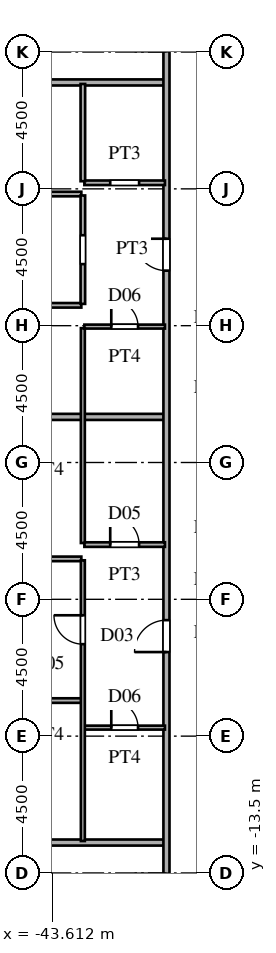
"""IFC4 building model, lengths in metres.
Left out: names, types, materials, properties, quantities, classifications, styles, units other than length and angle.
Written with IfcOpenShell. Run it as: python <this file> out.ifc"""

import sys

from ifc_helpers import new_model, si_unit, direction, frame, frame_2d, origin, place, context, subcontext, project, spatial, rectangle, extrude, source, transform, mapped, element, fill, save


model = new_model("IFC4")
c1 = context("Model", 3, precision=1e-05, world=origin(), true_north=direction((0.0, 1.0)))
c2 = subcontext(c1, "Body", "Model", "MODEL_VIEW")
j1 = project(units=[si_unit("LENGTHUNIT", "METRE"), si_unit("PLANEANGLEUNIT", "RADIAN")], contexts=[c1])
p1 = place(None, origin())
s1 = spatial("IfcSite", under=j1, at=p1, CompositionType="ELEMENT")
p2 = place(p1, origin())
s2 = spatial("IfcBuilding", under=s1, at=p2, CompositionType="ELEMENT")
p3 = place(p2, frame((0.0, 0.0, 54.9)))
s3 = spatial("IfcBuildingStorey", under=s2, at=p3, CompositionType="ELEMENT", Elevation=54.9)
p4 = place(p3, frame((-66.337, -12.5, 0.0), z_axis=(0.0, 0.0, 1.0), x_axis=(1.0, 0.0, 0.0)))
e1 = element("IfcWall", 1, at=p4, inside=s3, PredefinedType="PARTITIONING", context=c2, shape_type="SweptSolid", body=[
    extrude(rectangle(XDim=26.407, YDim=0.2, at=frame_2d((13.204, 0.0))), origin(), (0.0, 0.0, 1.0), 3.38),
])
p5 = place(p3, frame((-42.55, -8.72, 0.0), z_axis=(0.0, 0.0, 1.0), x_axis=(1.0, 0.0, 0.0)))
e2 = element("IfcWall", 2, at=p5, inside=s3, PredefinedType="PARTITIONING", context=c2, shape_type="SweptSolid", body=[
    extrude(rectangle(XDim=2.65, YDim=0.13, at=frame_2d((1.325, 0.0))), origin(), (0.0, 0.0, 1.0), 3.38),
])
p6 = place(p5, frame((0.885, 0.0, 0.0)))
e3 = element("IfcOpeningElement", 3, at=p6, cuts=e2, PredefinedType="OPENING", context=c2, shape_type="SweptSolid", body=[
    extrude(rectangle(XDim=0.88, YDim=2.1, at=frame_2d((0.44, 1.05))), frame((0.0, 0.075, 0.0), z_axis=(0.0, -1.0, 0.0), x_axis=(1.0, 0.0, 0.0)), (0.0, 0.0, 1.0), 0.15),
])
p7 = place(p3, frame((-72.535, -7.83, 0.0), z_axis=(0.0, 0.0, 1.0), x_axis=(1.0, 0.0, 0.0)))
e4 = element("IfcWall", 4, at=p7, inside=s3, PredefinedType="PARTITIONING", context=c2, shape_type="SweptSolid", body=[
    extrude(rectangle(XDim=29.885, YDim=0.15, at=frame_2d((14.942, 0.0))), origin(), (0.0, 0.0, 1.0), 3.38),
])
p8 = place(p7, frame((23.51, 0.0, 0.0)))
e5 = element("IfcOpeningElement", 5, at=p8, cuts=e4, PredefinedType="OPENING", context=c2, shape_type="SweptSolid", body=[
    extrude(rectangle(XDim=0.95, YDim=2.15, at=frame_2d((0.475, 1.075))), frame((0.0, 0.085, 0.0), z_axis=(0.0, -1.0, 0.0), x_axis=(1.0, 0.0, 0.0)), (0.0, 0.0, 1.0), 0.17),
])
p9 = place(p7, frame((14.71, 0.0, 0.0)))
e6 = element("IfcOpeningElement", 6, at=p9, cuts=e4, PredefinedType="OPENING", context=c2, shape_type="SweptSolid", body=[
    extrude(rectangle(XDim=0.95, YDim=2.15, at=frame_2d((0.475, 1.075))), frame((0.0, 0.085, 0.0), z_axis=(0.0, -1.0, 0.0), x_axis=(1.0, 0.0, 0.0)), (0.0, 0.0, 1.0), 0.17),
])
p10 = place(p3, frame((-72.535, -3.17, 0.0), z_axis=(0.0, 0.0, 1.0), x_axis=(1.0, 0.0, 0.0)))
e7 = element("IfcWall", 7, at=p10, inside=s3, PredefinedType="PARTITIONING", context=c2, shape_type="SweptSolid", body=[
    extrude(rectangle(XDim=29.885, YDim=0.15, at=frame_2d((14.942, 0.0))), origin(), (0.0, 0.0, 1.0), 3.38),
])
p11 = place(p10, frame((23.51, 0.0, 0.0)))
e8 = element("IfcOpeningElement", 8, at=p11, cuts=e7, PredefinedType="OPENING", context=c2, shape_type="SweptSolid", body=[
    extrude(rectangle(XDim=0.95, YDim=2.15, at=frame_2d((0.475, 1.075))), frame((0.0, 0.085, 0.0), z_axis=(0.0, -1.0, 0.0), x_axis=(1.0, 0.0, 0.0)), (0.0, 0.0, 1.0), 0.17),
])
p12 = place(p10, frame((14.71, 0.0, 0.0)))
e9 = element("IfcOpeningElement", 9, at=p12, cuts=e7, PredefinedType="OPENING", context=c2, shape_type="SweptSolid", body=[
    extrude(rectangle(XDim=0.95, YDim=2.15, at=frame_2d((0.475, 1.075))), frame((0.0, 0.085, 0.0), z_axis=(0.0, -1.0, 0.0), x_axis=(1.0, 0.0, 0.0)), (0.0, 0.0, 1.0), 0.17),
])
p13 = place(p3, frame((-42.55, -2.7, 0.0), z_axis=(0.0, 0.0, 1.0), x_axis=(1.0, 0.0, 0.0)))
e10 = element("IfcWall", 10, at=p13, inside=s3, PredefinedType="PARTITIONING", context=c2, shape_type="SweptSolid", body=[
    extrude(rectangle(XDim=2.65, YDim=0.15, at=frame_2d((1.325, 0.0))), origin(), (0.0, 0.0, 1.0), 3.38),
])
p14 = place(p13, frame((0.85, 0.0, 0.0)))
e11 = element("IfcOpeningElement", 11, at=p14, cuts=e10, PredefinedType="OPENING", context=c2, shape_type="SweptSolid", body=[
    extrude(rectangle(XDim=0.95, YDim=2.15, at=frame_2d((0.475, 1.075))), frame((0.0, 0.085, 0.0), z_axis=(0.0, -1.0, 0.0), x_axis=(1.0, 0.0, 0.0)), (0.0, 0.0, 1.0), 0.17),
])
p15 = place(p3, frame((-72.505, 1.5, 0.0), z_axis=(0.0, 0.0, 1.0), x_axis=(1.0, 0.0, 0.0)))
e12 = element("IfcWall", 12, at=p15, inside=s3, PredefinedType="PARTITIONING", context=c2, shape_type="SweptSolid", body=[
    extrude(rectangle(XDim=32.575, YDim=0.2, at=frame_2d((16.288, 0.0))), origin(), (0.0, 0.0, 1.0), 3.38),
])
p16 = place(p3, frame((-42.55, 4.47, 0.0), z_axis=(0.0, 0.0, 1.0), x_axis=(1.0, 0.0, 0.0)))
e13 = element("IfcWall", 13, at=p16, inside=s3, PredefinedType="PARTITIONING", context=c2, shape_type="SweptSolid", body=[
    extrude(rectangle(XDim=2.65, YDim=0.13, at=frame_2d((1.325, 0.0))), origin(), (0.0, 0.0, 1.0), 2.68),
])
p17 = place(p16, frame((0.885, 0.0, 0.0)))
e14 = element("IfcOpeningElement", 14, at=p17, cuts=e13, PredefinedType="OPENING", context=c2, shape_type="SweptSolid", body=[
    extrude(rectangle(XDim=0.88, YDim=2.1, at=frame_2d((0.44, 1.05))), frame((0.0, 0.075, 0.0), z_axis=(0.0, -1.0, 0.0), x_axis=(1.0, 0.0, 0.0)), (0.0, 0.0, 1.0), 0.15),
])
p18 = place(p3, frame((-72.535, 5.17, 0.0), z_axis=(0.0, 0.0, 1.0), x_axis=(1.0, 0.0, 0.0)))
e15 = element("IfcWall", 15, at=p18, inside=s3, PredefinedType="PARTITIONING", context=c2, shape_type="SweptSolid", body=[
    extrude(rectangle(XDim=29.885, YDim=0.15, at=frame_2d((14.942, 0.0))), origin(), (0.0, 0.0, 1.0), 3.38),
])
p19 = place(p18, frame((23.51, 0.0, 0.0)))
e16 = element("IfcOpeningElement", 16, at=p19, cuts=e15, PredefinedType="OPENING", context=c2, shape_type="SweptSolid", body=[
    extrude(rectangle(XDim=0.95, YDim=2.15, at=frame_2d((0.475, 1.075))), frame((0.0, 0.085, 0.0), z_axis=(0.0, -1.0, 0.0), x_axis=(1.0, 0.0, 0.0)), (0.0, 0.0, 1.0), 0.17),
])
p20 = place(p18, frame((14.71, 0.0, 0.0)))
e17 = element("IfcOpeningElement", 17, at=p20, cuts=e15, PredefinedType="OPENING", context=c2, shape_type="SweptSolid", body=[
    extrude(rectangle(XDim=0.95, YDim=2.15, at=frame_2d((0.475, 1.075))), frame((0.0, 0.085, 0.0), z_axis=(0.0, -1.0, 0.0), x_axis=(1.0, 0.0, 0.0)), (0.0, 0.0, 1.0), 0.17),
])
p21 = place(p3, frame((-72.535, 8.83, 0.0), z_axis=(0.0, 0.0, 1.0), x_axis=(1.0, 0.0, 0.0)))
e18 = element("IfcWall", 18, at=p21, inside=s3, PredefinedType="PARTITIONING", context=c2, shape_type="SweptSolid", body=[
    extrude(rectangle(XDim=29.885, YDim=0.15, at=frame_2d((14.942, 0.0))), origin(), (0.0, 0.0, 1.0), 3.38),
])
p22 = place(p21, frame((23.51, 0.0, 0.0)))
e19 = element("IfcOpeningElement", 19, at=p22, cuts=e18, PredefinedType="OPENING", context=c2, shape_type="SweptSolid", body=[
    extrude(rectangle(XDim=0.95, YDim=2.15, at=frame_2d((0.475, 1.075))), frame((0.0, 0.085, 0.0), z_axis=(0.0, -1.0, 0.0), x_axis=(1.0, 0.0, 0.0)), (0.0, 0.0, 1.0), 0.17),
])
p23 = place(p21, frame((14.71, 0.0, 0.0)))
e20 = element("IfcOpeningElement", 20, at=p23, cuts=e18, PredefinedType="OPENING", context=c2, shape_type="SweptSolid", body=[
    extrude(rectangle(XDim=0.95, YDim=2.15, at=frame_2d((0.475, 1.075))), frame((0.0, 0.085, 0.0), z_axis=(0.0, -1.0, 0.0), x_axis=(1.0, 0.0, 0.0)), (0.0, 0.0, 1.0), 0.17),
])
p24 = place(p3, frame((-42.55, 9.2, 0.0), z_axis=(0.0, 0.0, 1.0), x_axis=(1.0, 0.0, 0.0)))
e21 = element("IfcWall", 21, at=p24, inside=s3, PredefinedType="PARTITIONING", context=c2, shape_type="SweptSolid", body=[
    extrude(rectangle(XDim=2.65, YDim=0.15, at=frame_2d((1.325, 0.0))), origin(), (0.0, 0.0, 1.0), 3.38),
])
p25 = place(p24, frame((0.85, 0.0, 0.0)))
e22 = element("IfcOpeningElement", 22, at=p25, cuts=e21, PredefinedType="OPENING", context=c2, shape_type="SweptSolid", body=[
    extrude(rectangle(XDim=0.95, YDim=2.15, at=frame_2d((0.475, 1.075))), frame((0.0, 0.085, 0.0), z_axis=(0.0, -1.0, 0.0), x_axis=(1.0, 0.0, 0.0)), (0.0, 0.0, 1.0), 0.17),
])
p26 = place(p3, frame((-66.337, 12.5, 0.0), z_axis=(0.0, 0.0, 1.0), x_axis=(1.0, 0.0, 0.0)))
e23 = element("IfcWall", 23, at=p26, inside=s3, PredefinedType="PARTITIONING", context=c2, shape_type="SweptSolid", body=[
    extrude(rectangle(XDim=26.407, YDim=0.2, at=frame_2d((13.204, 0.0))), origin(), (0.0, 0.0, 1.0), 3.38),
])
p27 = place(p3, frame((-42.6, -12.45, 0.0), z_axis=(0.0, 0.0, 1.0), x_axis=(0.0, 1.0, 0.0)))
e24 = element("IfcWall", 24, at=p27, inside=s3, PredefinedType="PARTITIONING", context=c2, shape_type="SweptSolid", body=[
    extrude(rectangle(XDim=9.233, YDim=0.13, at=frame_2d((4.616, 0.0))), origin(), (0.0, 0.0, 1.0), 3.38),
])
p28 = place(p27, frame((6.475, 0.0, 0.0)))
e25 = element("IfcOpeningElement", 25, at=p28, cuts=e24, PredefinedType="OPENING", context=c2, shape_type="SweptSolid", body=[
    extrude(rectangle(XDim=0.95, YDim=2.15, at=frame_2d((0.475, 1.075))), frame((0.0, 0.075, 0.0), z_axis=(0.0, -1.0, 0.0), x_axis=(1.0, 0.0, 0.0)), (0.0, 0.0, 1.0), 0.15),
])
p29 = place(p3, frame((-42.6, -2.648, 0.0), z_axis=(0.0, 0.0, 1.0), x_axis=(0.0, 1.0, 0.0)))
e26 = element("IfcWall", 26, at=p29, inside=s3, PredefinedType="PARTITIONING", context=c2, shape_type="SweptSolid", body=[
    extrude(rectangle(XDim=7.066, YDim=0.13, at=frame_2d((3.533, 0.0))), origin(), (0.0, 0.0, 1.0), 3.38),
])
p30 = place(p3, frame((-42.6, 5.217, 0.0), z_axis=(0.0, 0.0, 1.0), x_axis=(0.0, 1.0, 0.0)))
e27 = element("IfcWall", 27, at=p30, inside=s3, PredefinedType="PARTITIONING", context=c2, shape_type="SweptSolid", body=[
    extrude(rectangle(XDim=3.566, YDim=0.15, at=frame_2d((1.783, 0.0))), origin(), (0.0, 0.0, 1.0), 3.38),
])
p31 = place(p30, frame((1.308, 0.0, 0.0)))
e28 = element("IfcOpeningElement", 28, at=p31, cuts=e27, PredefinedType="OPENING", context=c2, shape_type="SweptSolid", body=[
    extrude(rectangle(XDim=0.95, YDim=2.15, at=frame_2d((0.475, 1.075))), frame((0.0, 0.085, 0.0), z_axis=(0.0, -1.0, 0.0), x_axis=(1.0, 0.0, 0.0)), (0.0, 0.0, 1.0), 0.17),
])
p32 = place(p3, frame((-42.6, 9.252, 0.0), z_axis=(0.0, 0.0, 1.0), x_axis=(0.0, 1.0, 0.0)))
e29 = element("IfcWall", 29, at=p32, inside=s3, PredefinedType="PARTITIONING", context=c2, shape_type="SweptSolid", body=[
    extrude(rectangle(XDim=3.198, YDim=0.15, at=frame_2d((1.599, 0.0))), origin(), (0.0, 0.0, 1.0), 3.38),
])
p33 = place(p3, frame((-39.85, -15.515, 0.0), z_axis=(0.0, 0.0, 1.0), x_axis=(0.0, 1.0, 0.0)))
e30 = element("IfcWall", 30, at=p33, inside=s3, PredefinedType="PARTITIONING", context=c2, shape_type="SweptSolid", body=[
    extrude(rectangle(XDim=31.03, YDim=0.2, at=frame_2d((15.515, 0.0))), origin(), (0.0, 0.0, 1.0), 3.38),
])
p34 = place(p33, frame((0.94, 0.0, 0.0)))
e31 = element("IfcOpeningElement", 31, at=p34, cuts=e30, PredefinedType="OPENING", context=c2, shape_type="SweptSolid", body=[
    extrude(rectangle(XDim=1.05, YDim=2.25, at=frame_2d((0.525, 1.125))), frame((0.0, 0.11, 0.0), z_axis=(0.0, -1.0, 0.0), x_axis=(1.0, 0.0, 0.0)), (0.0, 0.0, 1.0), 0.22),
])
p35 = place(p33, frame((9.28, 0.0, 0.0)))
e32 = element("IfcOpeningElement", 32, at=p35, cuts=e30, PredefinedType="OPENING", context=c2, shape_type="SweptSolid", body=[
    extrude(rectangle(XDim=1.05, YDim=2.25, at=frame_2d((0.525, 1.125))), frame((0.0, 0.11, 0.0), z_axis=(0.0, -1.0, 0.0), x_axis=(1.0, 0.0, 0.0)), (0.0, 0.0, 1.0), 0.22),
])
p36 = place(p33, frame((21.825, 0.0, 0.0)))
e33 = element("IfcOpeningElement", 33, at=p36, cuts=e30, PredefinedType="OPENING", context=c2, shape_type="SweptSolid", body=[
    extrude(rectangle(XDim=1.05, YDim=2.25, at=frame_2d((0.525, 1.125))), frame((0.0, 0.11, 0.0), z_axis=(0.0, -1.0, 0.0), x_axis=(1.0, 0.0, 0.0)), (0.0, 0.0, 1.0), 0.22),
])
p37 = place(p33, frame((29.04, 0.0, 0.0)))
e34 = element("IfcOpeningElement", 34, at=p37, cuts=e30, PredefinedType="OPENING", context=c2, shape_type="SweptSolid", body=[
    extrude(rectangle(XDim=1.05, YDim=2.25, at=frame_2d((0.525, 1.125))), frame((0.0, 0.11, 0.0), z_axis=(0.0, -1.0, 0.0), x_axis=(1.0, 0.0, 0.0)), (0.0, 0.0, 1.0), 0.22),
])
m1 = source(origin(), c2, "Body", "SweptSolid", [
    extrude(rectangle(XDim=0.88, YDim=2.1, at=frame_2d((0.44, 1.05))), frame((0.0, 0.025, 0.0), z_axis=(0.0, -1.0, 0.0), x_axis=(1.0, 0.0, 0.0)), (0.0, 0.0, 1.0), 0.05),
])
p38 = place(p6, origin())
e35 = element("IfcDoor", 35, at=p38, inside=s3, OperationType="SINGLE_SWING_LEFT", PredefinedType="DOOR", context=c2, shape_type="MappedRepresentation", body=[
    mapped(m1, transform((0.0, 0.0, 0.0), scale=1.0)),
])
fill(e3, e35)
m2 = source(origin(), c2, "Body", "SweptSolid", [
    extrude(rectangle(XDim=0.95, YDim=2.15, at=frame_2d((0.475, 1.075))), frame((0.0, 0.025, 0.0), z_axis=(0.0, -1.0, 0.0), x_axis=(1.0, 0.0, 0.0)), (0.0, 0.0, 1.0), 0.05),
])
p39 = place(p14, origin())
e36 = element("IfcDoor", 36, at=p39, inside=s3, OperationType="SINGLE_SWING_LEFT", PredefinedType="DOOR", context=c2, shape_type="MappedRepresentation", body=[
    mapped(m2, transform((0.0, 0.0, 0.0), scale=1.0)),
])
fill(e11, e36)
p40 = place(p17, origin())
e37 = element("IfcDoor", 37, at=p40, inside=s3, OperationType="SINGLE_SWING_LEFT", PredefinedType="DOOR", context=c2, shape_type="MappedRepresentation", body=[
    mapped(m1, transform((0.0, 0.0, 0.0), scale=1.0)),
])
fill(e14, e37)
p41 = place(p28, origin())
e38 = element("IfcDoor", 38, at=p41, inside=s3, OperationType="SINGLE_SWING_RIGHT", PredefinedType="DOOR", context=c2, shape_type="MappedRepresentation", body=[
    mapped(m2, transform((0.0, 0.0, 0.0), scale=1.0)),
])
fill(e25, e38)
m3 = source(origin(), c2, "Body", "SweptSolid", [
    extrude(rectangle(XDim=1.05, YDim=2.25, at=frame_2d((0.525, 1.125))), frame((0.0, 0.025, 0.0), z_axis=(0.0, -1.0, 0.0), x_axis=(1.0, 0.0, 0.0)), (0.0, 0.0, 1.0), 0.05),
])
p42 = place(p35, origin())
e39 = element("IfcDoor", 39, at=p42, inside=s3, OperationType="SINGLE_SWING_LEFT", PredefinedType="DOOR", context=c2, shape_type="MappedRepresentation", body=[
    mapped(m3, transform((0.0, 0.0, 0.0), scale=1.0)),
])
fill(e32, e39)
p43 = place(p36, origin())
e40 = element("IfcDoor", 40, at=p43, inside=s3, OperationType="SINGLE_SWING_RIGHT", PredefinedType="DOOR", context=c2, shape_type="MappedRepresentation", body=[
    mapped(m3, transform((0.0, 0.0, 0.0), scale=1.0)),
])
fill(e33, e40)
save(model, sys.argv[1])
